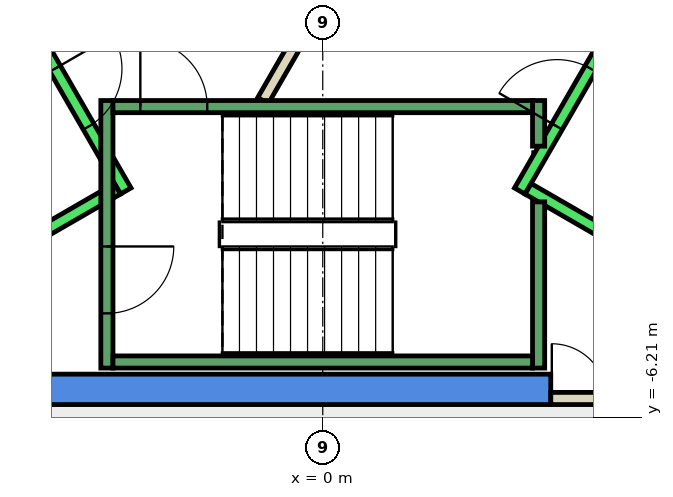
"""IFC4 building model, lengths in metres.
Left out: names, types, materials, properties, quantities, classifications, styles, units other than length and angle.
Written with IfcOpenShell. Run it as: python <this file> out.ifc"""

import sys

from ifc_helpers import new_model, si_unit, direction, frame, frame_2d, origin, place, context, subcontext, project, spatial, polyline, rectangle, outline, extrude, element, fill, save


model = new_model("IFC4")
c1 = context("Model", 3, precision=1e-05, world=origin(), true_north=direction((0.0, 1.0)))
c2 = subcontext(c1, "Body", "Model", "MODEL_VIEW")
j1 = project(units=[si_unit("LENGTHUNIT", "METRE"), si_unit("PLANEANGLEUNIT", "RADIAN")], contexts=[c1])
p1 = place(None, origin())
s1 = spatial("IfcSite", under=j1, at=p1, CompositionType="ELEMENT")
p2 = place(p1, origin())
s2 = spatial("IfcBuilding", under=s1, at=p2, CompositionType="ELEMENT")
p3 = place(p2, frame((0.0, 0.0, 311.6)))
s3 = spatial("IfcBuildingStorey", under=s2, at=p3, CompositionType="ELEMENT", Elevation=311.6)
p4 = place(p3, frame((0.0, 0.0, -0.34)))
e1 = element("IfcWall", 1, at=p4, inside=s3, PredefinedType="SHEAR", context=c2, shape_type="SweptSolid", body=[
    extrude(outline(polyline([(3.75, -6.0), (3.75, -5.5), (-4.619, -5.5), (-4.907, -6.0), (3.75, -6.0)])), origin(), (0.0, 0.0, 1.0), 3.6),
])
p5 = place(p3, frame((-0.982, -1.0, 0.0), z_axis=(0.0, 0.0, 1.0), x_axis=(0.50024047865, 0.865886518847, 0.0)))
e2 = element("IfcWall", 2, at=p5, inside=s3, PredefinedType="PARTITIONING", context=c2, shape_type="SweptSolid", body=[
    extrude(rectangle(XDim=1.863, YDim=0.2, at=frame_2d((0.931, 0.0))), origin(), (0.0, 0.0, 1.0), 3.26),
])
p6 = place(p3, frame((3.75, -5.9, 0.0), z_axis=(0.0, 0.0, 1.0), x_axis=(1.0, 0.0, 0.0)))
e3 = element("IfcWall", 3, at=p6, inside=s3, PredefinedType="PARTITIONING", context=c2, shape_type="SweptSolid", body=[
    extrude(rectangle(XDim=0.926, YDim=0.2, at=frame_2d((0.463, 0.0))), origin(), (0.0, 0.0, 1.0), 2.4),
])
p7 = place(p6, frame((0.017, 0.0, 0.0)))
e4 = element("IfcOpeningElement", 4, at=p7, cuts=e3, PredefinedType="OPENING", context=c2, shape_type="SweptSolid", body=[
    extrude(rectangle(XDim=0.9, YDim=2.1, at=frame_2d((0.45, 1.05))), frame((0.0, 0.11, 0.0), z_axis=(0.0, -1.0, 0.0), x_axis=(1.0, 0.0, 0.0)), (0.0, 0.0, 1.0), 0.22),
])
p8 = place(p3, frame((-5.94, 2.188, 0.0), z_axis=(0.0, 0.0, 1.0), x_axis=(0.500034260056, -0.866005622828, 0.0)))
e5 = element("IfcWall", 5, at=p8, inside=s3, PredefinedType="STANDARD", context=c2, shape_type="SweptSolid", body=[
    extrude(rectangle(XDim=5.399, YDim=0.2, at=frame_2d((2.7, 0.0))), origin(), (0.0, 0.0, 1.0), 3.26),
])
p9 = place(p8, frame((3.075, 0.0, 0.0)))
e6 = element("IfcOpeningElement", 6, at=p9, cuts=e5, PredefinedType="OPENING", context=c2, shape_type="SweptSolid", body=[
    extrude(rectangle(XDim=1.1, YDim=2.1, at=frame_2d((0.55, 1.05))), frame((0.0, 0.11, 0.0), z_axis=(0.0, -1.0, 0.0), x_axis=(1.0, 0.0, 0.0)), (0.0, 0.0, 1.0), 0.22),
])
p10 = place(p8, frame((1.225, 0.0, 0.0)))
e7 = element("IfcOpeningElement", 7, at=p10, cuts=e5, PredefinedType="OPENING", context=c2, shape_type="SweptSolid", body=[
    extrude(rectangle(XDim=1.1, YDim=2.1, at=frame_2d((0.55, 1.05))), frame((0.0, 0.11, 0.0), z_axis=(0.0, -1.0, 0.0), x_axis=(1.0, 0.0, 0.0)), (0.0, 0.0, 1.0), 0.22),
])
p11 = place(p3, frame((-3.377, -2.452, 0.0), z_axis=(0.0, 0.0, 1.0), x_axis=(-0.865955154139, -0.50012165622, 0.0)))
e8 = element("IfcWall", 8, at=p11, inside=s3, PredefinedType="STANDARD", context=c2, shape_type="SweptSolid", body=[
    extrude(rectangle(XDim=2.4, YDim=0.2, at=frame_2d((1.2, 0.0))), origin(), (0.0, 0.0, 1.0), 3.26),
])
p12 = place(p3, frame((3.24, -2.488, 0.0), z_axis=(0.0, 0.0, 1.0), x_axis=(0.500034260056, 0.866005622828, 0.0)))
e9 = element("IfcWall", 9, at=p12, inside=s3, PredefinedType="STANDARD", context=c2, shape_type="SweptSolid", body=[
    extrude(rectangle(XDim=5.399, YDim=0.2, at=frame_2d((2.7, 0.0))), origin(), (0.0, 0.0, 1.0), 3.26),
])
p13 = place(p12, frame((3.225, 0.0, 0.0)))
e10 = element("IfcOpeningElement", 10, at=p13, cuts=e9, PredefinedType="OPENING", context=c2, shape_type="SweptSolid", body=[
    extrude(rectangle(XDim=1.1, YDim=2.1, at=frame_2d((0.55, 1.05))), frame((0.0, 0.11, 0.0), z_axis=(0.0, -1.0, 0.0), x_axis=(1.0, 0.0, 0.0)), (0.0, 0.0, 1.0), 0.22),
])
p14 = place(p12, frame((1.225, 0.0, 0.0)))
e11 = element("IfcOpeningElement", 11, at=p14, cuts=e9, PredefinedType="OPENING", context=c2, shape_type="SweptSolid", body=[
    extrude(rectangle(XDim=1.1, YDim=2.1, at=frame_2d((0.55, 1.05))), frame((0.0, 0.11, 0.0), z_axis=(0.0, -1.0, 0.0), x_axis=(1.0, 0.0, 0.0)), (0.0, 0.0, 1.0), 0.22),
])
p15 = place(p3, frame((3.377, -2.452, 0.0), z_axis=(0.0, 0.0, 1.0), x_axis=(0.865955154139, -0.50012165622, 0.0)))
e12 = element("IfcWall", 12, at=p15, inside=s3, PredefinedType="STANDARD", context=c2, shape_type="SweptSolid", body=[
    extrude(rectangle(XDim=2.4, YDim=0.2, at=frame_2d((1.2, 0.0))), origin(), (0.0, 0.0, 1.0), 3.26),
])
p16 = place(p3, frame((-3.55, -1.0, 0.0), z_axis=(0.0, 0.0, 1.0), x_axis=(0.0, -1.0, 0.0)))
e13 = element("IfcWall", 13, at=p16, inside=s3, PredefinedType="STANDARD", context=c2, shape_type="SweptSolid", body=[
    extrude(rectangle(XDim=4.4, YDim=0.2, at=frame_2d((2.2, 0.0))), origin(), (0.0, 0.0, 1.0), 3.26),
])
p17 = place(p16, frame((2.4, 0.0, 0.0)))
e14 = element("IfcOpeningElement", 14, at=p17, cuts=e13, PredefinedType="OPENING", context=c2, shape_type="SweptSolid", body=[
    extrude(rectangle(XDim=1.1, YDim=2.2, at=frame_2d((0.55, 1.1))), frame((0.0, 0.11, 0.0), z_axis=(0.0, -1.0, 0.0), x_axis=(1.0, 0.0, 0.0)), (0.0, 0.0, 1.0), 0.22),
])
p18 = place(p3, frame((3.55, -2.667, 0.0), z_axis=(0.0, 0.0, 1.0), x_axis=(0.0, -1.0, 0.0)))
e15 = element("IfcWall", 15, at=p18, inside=s3, PredefinedType="STANDARD", context=c2, shape_type="SweptSolid", body=[
    extrude(rectangle(XDim=2.733, YDim=0.2, at=frame_2d((1.366, 0.0))), origin(), (0.0, 0.0, 1.0), 3.26),
])
p19 = place(p3, frame((3.55, -1.0, 0.0), z_axis=(0.0, 0.0, 1.0), x_axis=(0.0, -1.0, 0.0)))
e16 = element("IfcWall", 16, at=p19, inside=s3, PredefinedType="STANDARD", context=c2, shape_type="SweptSolid", body=[
    extrude(rectangle(XDim=0.751, YDim=0.2, at=frame_2d((0.375, 0.0))), origin(), (0.0, 0.0, 1.0), 3.26),
])
p20 = place(p3, frame((-3.45, -1.1, 0.0), z_axis=(0.0, 0.0, 1.0), x_axis=(1.0, 0.0, 0.0)))
e17 = element("IfcWall", 17, at=p20, inside=s3, PredefinedType="STANDARD", context=c2, shape_type="SweptSolid", body=[
    extrude(rectangle(XDim=6.9, YDim=0.2, at=frame_2d((3.45, 0.0))), origin(), (0.0, 0.0, 1.0), 3.26),
])
p21 = place(p20, frame((0.45, 0.0, 0.0)))
e18 = element("IfcOpeningElement", 18, at=p21, cuts=e17, PredefinedType="OPENING", context=c2, shape_type="SweptSolid", body=[
    extrude(rectangle(XDim=1.1, YDim=2.2, at=frame_2d((0.55, 1.1))), frame((0.0, 0.11, 0.0), z_axis=(0.0, -1.0, 0.0), x_axis=(1.0, 0.0, 0.0)), (0.0, 0.0, 1.0), 0.22),
])
p22 = place(p3, frame((-3.45, -5.3, 0.0), z_axis=(0.0, 0.0, 1.0), x_axis=(1.0, 0.0, 0.0)))
e19 = element("IfcWall", 19, at=p22, inside=s3, PredefinedType="STANDARD", context=c2, shape_type="SweptSolid", body=[
    extrude(rectangle(XDim=6.9, YDim=0.2, at=frame_2d((3.45, 0.0))), origin(), (0.0, 0.0, 1.0), 3.26),
])
p23 = place(p7, origin())
e20 = element("IfcDoor", 20, at=p23, inside=s3, OperationType="SINGLE_SWING_LEFT", PredefinedType="DOOR", context=c2, shape_type="SweptSolid", body=[
    extrude(rectangle(XDim=0.9, YDim=2.1, at=frame_2d((0.45, 1.05))), frame((0.0, 0.025, 0.0), z_axis=(0.0, -1.0, 0.0), x_axis=(1.0, 0.0, 0.0)), (0.0, 0.0, 1.0), 0.05),
])
fill(e4, e20)
p24 = place(p9, origin())
e21 = element("IfcDoor", 21, at=p24, inside=s3, OperationType="SLIDING_TO_LEFT", PredefinedType="DOOR", context=c2, shape_type="SweptSolid", body=[
    extrude(rectangle(XDim=1.1, YDim=2.1, at=frame_2d((0.55, 1.05))), frame((0.0, 0.025, 0.0), z_axis=(0.0, -1.0, 0.0), x_axis=(1.0, 0.0, 0.0)), (0.0, 0.0, 1.0), 0.05),
])
fill(e6, e21)
p25 = place(p14, origin())
e22 = element("IfcDoor", 22, at=p25, inside=s3, OperationType="SLIDING_TO_LEFT", PredefinedType="DOOR", context=c2, shape_type="SweptSolid", body=[
    extrude(rectangle(XDim=1.1, YDim=2.1, at=frame_2d((0.55, 1.05))), frame((0.0, 0.025, 0.0), z_axis=(0.0, -1.0, 0.0), x_axis=(1.0, 0.0, 0.0)), (0.0, 0.0, 1.0), 0.05),
])
fill(e11, e22)
p26 = place(p21, origin())
e23 = element("IfcDoor", 23, at=p26, inside=s3, OperationType="SINGLE_SWING_LEFT", PredefinedType="DOOR", context=c2, shape_type="SweptSolid", body=[
    extrude(rectangle(XDim=1.1, YDim=2.2, at=frame_2d((0.55, 1.1))), frame((0.0, 0.025, 0.0), z_axis=(0.0, -1.0, 0.0), x_axis=(1.0, 0.0, 0.0)), (0.0, 0.0, 1.0), 0.05),
])
fill(e18, e23)
p27 = place(p17, origin())
e24 = element("IfcDoor", 24, at=p27, inside=s3, OperationType="SINGLE_SWING_LEFT", PredefinedType="DOOR", context=c2, shape_type="SweptSolid", body=[
    extrude(rectangle(XDim=1.1, YDim=2.2, at=frame_2d((0.55, 1.1))), frame((0.0, 0.025, 0.0), z_axis=(0.0, -1.0, 0.0), x_axis=(1.0, 0.0, 0.0)), (0.0, 0.0, 1.0), 0.05),
])
fill(e14, e24)
save(model, sys.argv[1])
